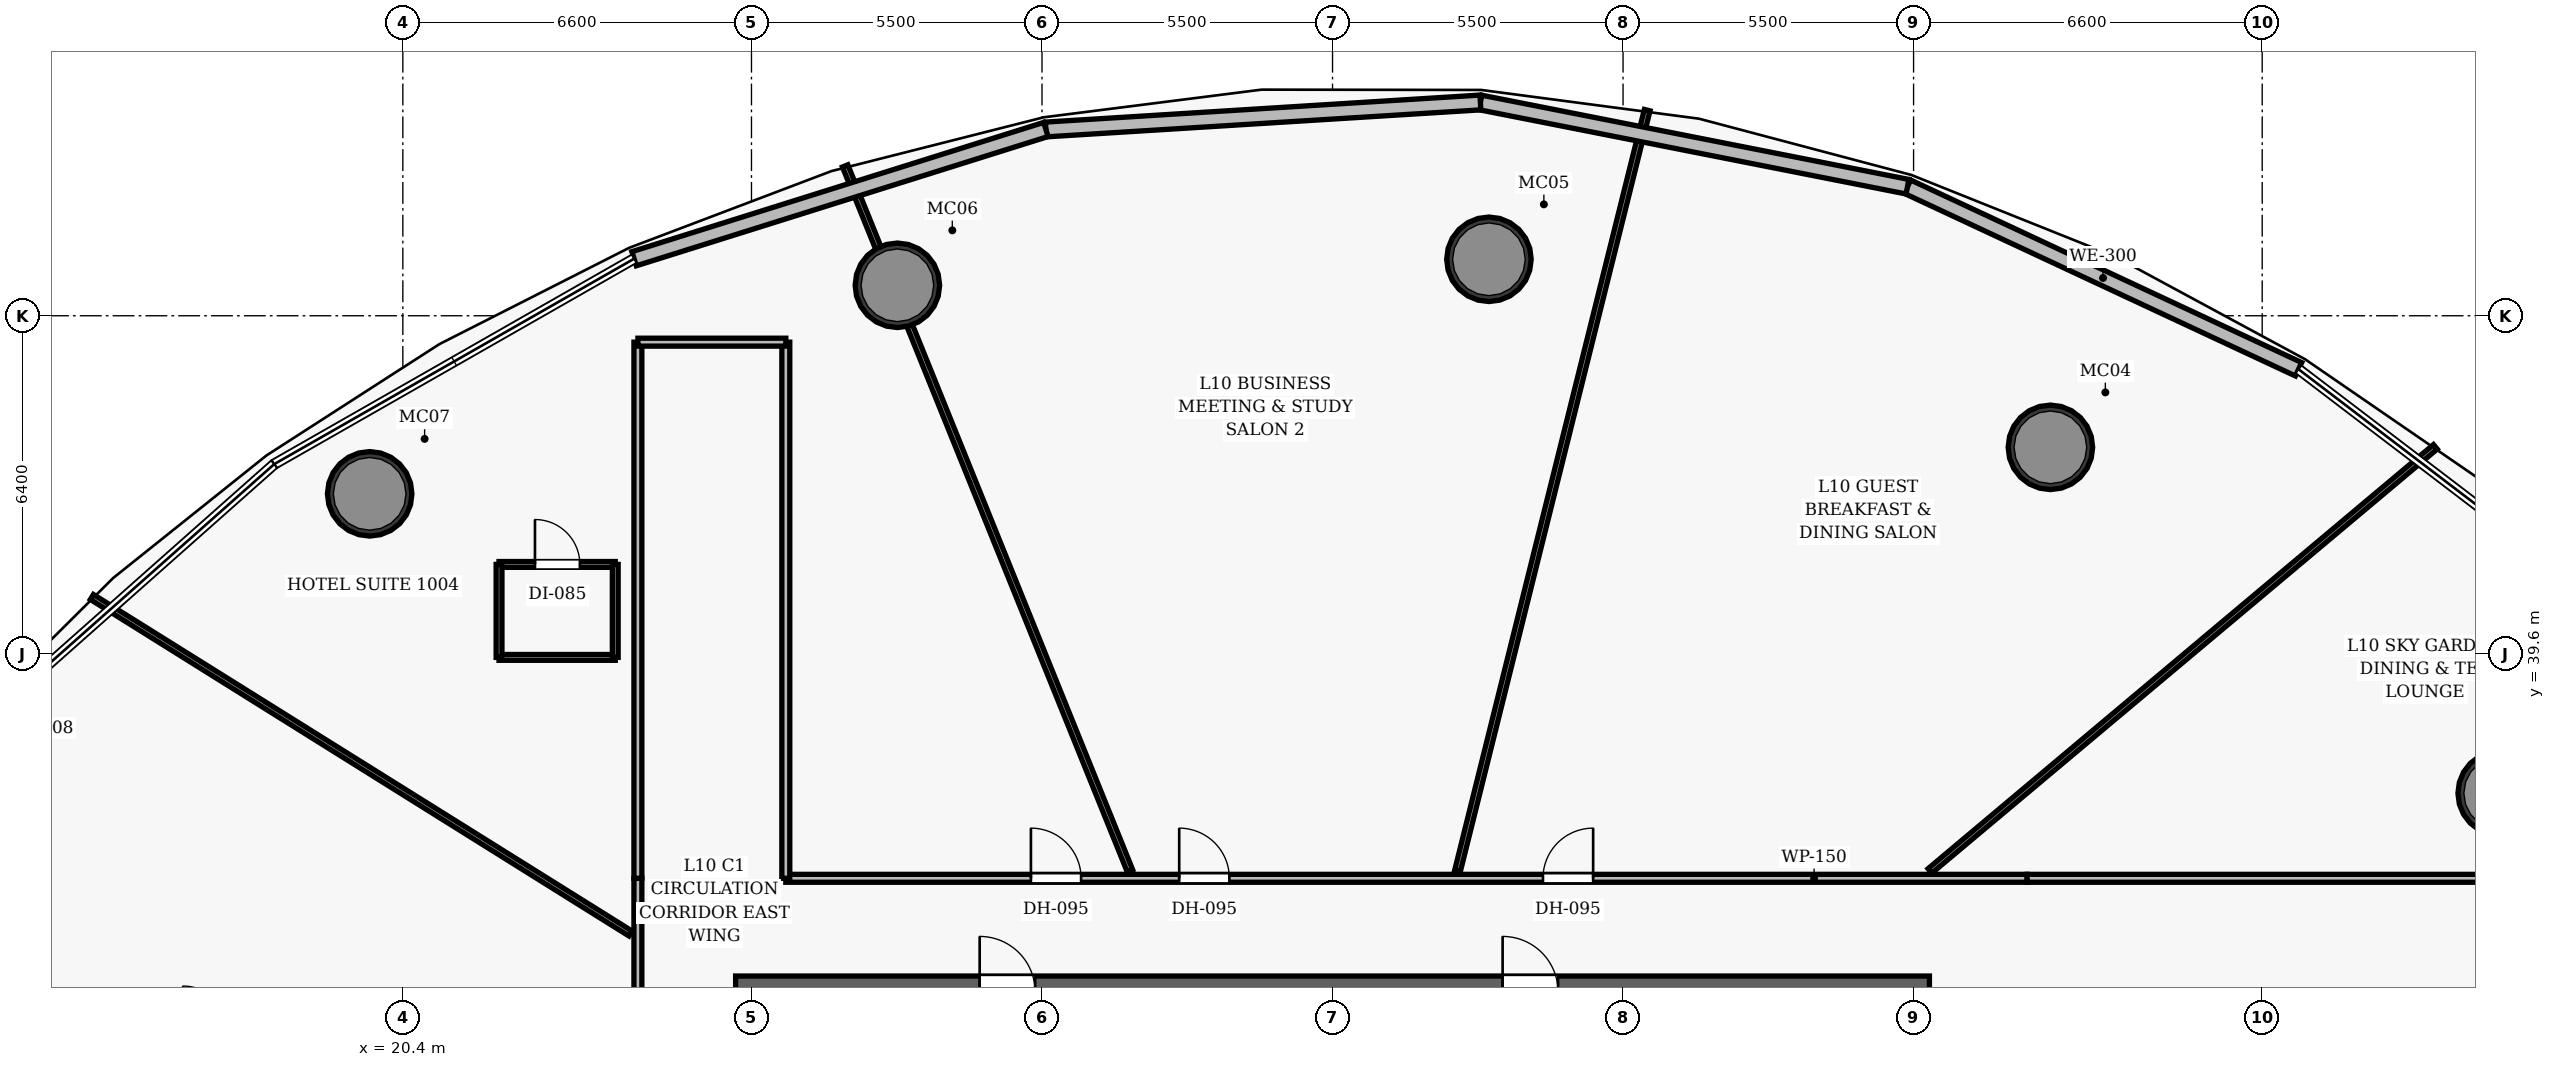
"""IFC4 building model, lengths in metres.
Left out: names, types, materials, properties, quantities, classifications, styles, units other than length and angle.
Written with IfcOpenShell. Run it as: python <this file> out.ifc"""

import sys

from ifc_helpers import new_model, si_unit, direction, frame, frame_2d, origin, origin_2d, place, context, subcontext, project, spatial, rectangle, hollow_circle, extrude, element, fill, save


model = new_model("IFC4")
c1 = context("Model", 3, precision=1e-05, world=origin(), true_north=direction((0.0, 1.0)))
c2 = subcontext(c1, "Body", "Model", "MODEL_VIEW")
j1 = project(units=[si_unit("LENGTHUNIT", "METRE"), si_unit("PLANEANGLEUNIT", "RADIAN")], contexts=[c1])
p1 = place(None, origin())
s1 = spatial("IfcSite", under=j1, at=p1, CompositionType="ELEMENT")
p2 = place(p1, origin())
s2 = spatial("IfcBuilding", under=s1, at=p2, CompositionType="ELEMENT")
p3 = place(p2, frame((0.0, 0.0, 51.9)))
s3 = spatial("IfcBuildingStorey", under=s2, at=p3, CompositionType="ELEMENT", Elevation=51.9)
p4 = place(p3, frame((26.7, 33.2, 0.0), z_axis=(0.0, 0.0, 1.0), x_axis=(1.0, 0.0, 0.0)))
e1 = element("IfcWall", 1, at=p4, inside=s3, PredefinedType="SHEAR", context=c2, shape_type="SweptSolid", body=[
    extrude(rectangle(XDim=22.6, YDim=0.6, at=frame_2d((11.3, 0.0))), origin(), (0.0, 0.0, 1.0), 3.5),
])
p5 = place(p4, frame((4.62, 0.0, 0.0)))
e2 = element("IfcOpeningElement", 2, at=p5, cuts=e1, PredefinedType="OPENING", context=c2, shape_type="SweptSolid", body=[
    extrude(rectangle(XDim=1.05, YDim=2.15, at=frame_2d((0.525, 1.075))), frame((0.0, 0.31, 0.0), z_axis=(0.0, -1.0, 0.0), x_axis=(1.0, 0.0, 0.0)), (0.0, 0.0, 1.0), 0.62),
])
p6 = place(p4, frame((14.52, 0.0, 0.0)))
e3 = element("IfcOpeningElement", 3, at=p6, cuts=e1, PredefinedType="OPENING", context=c2, shape_type="SweptSolid", body=[
    extrude(rectangle(XDim=1.05, YDim=2.15, at=frame_2d((0.525, 1.075))), frame((0.0, 0.31, 0.0), z_axis=(0.0, -1.0, 0.0), x_axis=(1.0, 0.0, 0.0)), (0.0, 0.0, 1.0), 0.62),
])
for number, where, z_axis, x_axis in (
    (4, (60.105, 36.96, 0.0), (0.0, 0.0, 1.0), (1.0, 0.0, 0.0)),
    (5, (51.59, 43.509, 0.0), (0.0, 0.0, 1.0), (1.0, 0.0, 0.0)),
    (6, (40.961, 47.069, 0.0), (0.0, 0.0, 1.0), (1.0, 0.0, 0.0)),
    (7, (29.762, 46.577, 0.0), (0.0, 0.0, 1.0), (1.0, 0.0, 0.0)),
    (8, (19.772, 42.629, 0.0), (0.0, 0.0, 1.0), (1.0, 0.0, 0.0)),
):
    element("IfcColumn", number, at=place(p3, frame(where, z_axis=z_axis, x_axis=x_axis)), inside=s3, PredefinedType="COLUMN", context=c2, shape_type="SweptSolid", body=[
        extrude(hollow_circle(Radius=0.8, WallThickness=0.06, at=origin_2d()), origin(), (0.0, 0.0, 1.0), 3.5),
    ])
p7 = place(p3, frame((27.65, 35.35, 0.0), z_axis=(0.0, 0.0, 1.0), x_axis=(1.0, 0.0, 0.0)))
e9 = element("IfcWall", 9, at=p7, inside=s3, PredefinedType="PARTITIONING", context=c2, shape_type="SweptSolid", body=[
    extrude(rectangle(XDim=23.5, YDim=0.15, at=frame_2d((11.75, 0.0))), origin(), (0.0, 0.0, 1.0), 2.6),
])
p8 = place(p7, frame((14.334, 0.0, 0.0)))
e10 = element("IfcOpeningElement", 10, at=p8, cuts=e9, PredefinedType="OPENING", context=c2, shape_type="SweptSolid", body=[
    extrude(rectangle(XDim=0.95, YDim=2.15, at=frame_2d((0.475, 1.075))), frame((0.0, 0.085, 0.0), z_axis=(0.0, -1.0, 0.0), x_axis=(1.0, 0.0, 0.0)), (0.0, 0.0, 1.0), 0.17),
])
p9 = place(p7, frame((7.447, 0.0, 0.0)))
e11 = element("IfcOpeningElement", 11, at=p9, cuts=e9, PredefinedType="OPENING", context=c2, shape_type="SweptSolid", body=[
    extrude(rectangle(XDim=0.95, YDim=2.15, at=frame_2d((0.475, 1.075))), frame((0.0, 0.085, 0.0), z_axis=(0.0, -1.0, 0.0), x_axis=(1.0, 0.0, 0.0)), (0.0, 0.0, 1.0), 0.17),
])
p10 = place(p7, frame((4.64, 0.0, 0.0)))
e12 = element("IfcOpeningElement", 12, at=p10, cuts=e9, PredefinedType="OPENING", context=c2, shape_type="SweptSolid", body=[
    extrude(rectangle(XDim=0.95, YDim=2.15, at=frame_2d((0.475, 1.075))), frame((0.0, 0.085, 0.0), z_axis=(0.0, -1.0, 0.0), x_axis=(1.0, 0.0, 0.0)), (0.0, 0.0, 1.0), 0.17),
])
p11 = place(p3, frame((24.85, 19.45, 0.0), z_axis=(0.0, 0.0, 1.0), x_axis=(0.0, 1.0, 0.0)))
e13 = element("IfcWall", 13, at=p11, inside=s3, PredefinedType="PARTITIONING", context=c2, shape_type="SweptSolid", body=[
    extrude(rectangle(XDim=15.9, YDim=0.15, at=frame_2d((7.95, 0.0))), origin(), (0.0, 0.0, 1.0), 2.6),
])
p12 = place(p11, frame((7.305, 0.0, 0.0)))
e14 = element("IfcOpeningElement", 14, at=p12, cuts=e13, PredefinedType="OPENING", context=c2, shape_type="SweptSolid", body=[
    extrude(rectangle(XDim=0.95, YDim=2.15, at=frame_2d((0.475, 1.075))), frame((0.0, 0.085, 0.0), z_axis=(0.0, -1.0, 0.0), x_axis=(1.0, 0.0, 0.0)), (0.0, 0.0, 1.0), 0.17),
])
p13 = place(p11, frame((3.964, 0.0, 0.0)))
e15 = element("IfcOpeningElement", 15, at=p13, cuts=e13, PredefinedType="OPENING", context=c2, shape_type="SweptSolid", body=[
    extrude(rectangle(XDim=0.95, YDim=2.15, at=frame_2d((0.475, 1.075))), frame((0.0, 0.085, 0.0), z_axis=(0.0, -1.0, 0.0), x_axis=(1.0, 0.0, 0.0)), (0.0, 0.0, 1.0), 0.17),
])
p14 = place(p3, frame((51.15, 35.35, 0.0), z_axis=(0.0, 0.0, 1.0), x_axis=(1.0, 0.0, 0.0)))
e16 = element("IfcWall", 16, at=p14, inside=s3, PredefinedType="PARTITIONING", context=c2, shape_type="SweptSolid", body=[
    extrude(rectangle(XDim=14.35, YDim=0.15, at=frame_2d((7.175, 0.0))), origin(), (0.0, 0.0, 1.0), 2.6),
])
for number, where, z_axis, x_axis in (
    (17, (24.85, 35.35, 0.0), (0.0, 0.0, 1.0), (0.0, 1.0, 0.0)),
    (18, (27.65, 35.35, 0.0), (0.0, 0.0, 1.0), (0.0, 1.0, 0.0)),
):
    element("IfcWall", number, at=place(p3, frame(where, z_axis=z_axis, x_axis=x_axis)), inside=s3, PredefinedType="PARTITIONING", context=c2, shape_type="SweptSolid", body=[
        extrude(rectangle(XDim=10.15, YDim=0.15, at=frame_2d((5.075, 0.0))), origin(), (0.0, 0.0, 1.0), 2.6),
    ])
p15 = place(p3, frame((24.85, 45.5, 0.0), z_axis=(0.0, 0.0, 1.0), x_axis=(1.0, 0.0, 0.0)))
e19 = element("IfcWall", 19, at=p15, inside=s3, PredefinedType="PARTITIONING", context=c2, shape_type="SweptSolid", body=[
    extrude(rectangle(XDim=2.8, YDim=0.15, at=frame_2d((1.4, 0.0))), origin(), (0.0, 0.0, 1.0), 2.6),
])
p16 = place(p3, frame((49.31, 35.49, 0.0), z_axis=(0.0, 0.0, 1.0), x_axis=(0.766037845648, 0.642795472165, 0.0)))
e20 = element("IfcWall", 20, at=p16, inside=s3, PredefinedType="PARTITIONING", context=c2, shape_type="SweptSolid", body=[
    extrude(rectangle(XDim=12.49, YDim=0.11, at=frame_2d((6.245, 0.0))), origin(), (0.0, 0.0, 1.0), 2.6),
])
p17 = place(p3, frame((40.366, 35.49, 0.0), z_axis=(0.0, 0.0, 1.0), x_axis=(0.241912498143, 0.970298069277, 0.0)))
e21 = element("IfcWall", 21, at=p17, inside=s3, PredefinedType="PARTITIONING", context=c2, shape_type="SweptSolid", body=[
    extrude(rectangle(XDim=14.844, YDim=0.11, at=frame_2d((7.422, 0.0))), origin(), (0.0, 0.0, 1.0), 2.6),
])
p18 = place(p3, frame((34.166, 35.49, 0.0), z_axis=(0.0, 0.0, 1.0), x_axis=(-0.374610825382, 0.92718214473, 0.0)))
e22 = element("IfcWall", 22, at=p18, inside=s3, PredefinedType="PARTITIONING", context=c2, shape_type="SweptSolid", body=[
    extrude(rectangle(XDim=14.395, YDim=0.11, at=frame_2d((7.198, 0.0))), origin(), (0.0, 0.0, 1.0), 2.6),
])
p19 = place(p3, frame((24.71, 34.304, 0.0), z_axis=(0.0, 0.0, 1.0), x_axis=(-0.848050772958, 0.529914980431, 0.0)))
e23 = element("IfcWall", 23, at=p19, inside=s3, PredefinedType="PARTITIONING", context=c2, shape_type="SweptSolid", body=[
    extrude(rectangle(XDim=12.024, YDim=0.11, at=frame_2d((6.012, 0.0))), origin(), (0.0, 0.0, 1.0), 2.6),
])
p20 = place(p3, frame((22.221, 39.532, 0.0), z_axis=(0.0, 0.0, 1.0), x_axis=(1.0, 0.0, 0.0)))
e24 = element("IfcWall", 24, at=p20, inside=s3, PredefinedType="PARTITIONING", context=c2, shape_type="SweptSolid", body=[
    extrude(rectangle(XDim=2.2, YDim=0.11, at=frame_2d((1.1, 0.0))), origin(), (0.0, 0.0, 1.0), 2.6),
])
p21 = place(p3, frame((22.221, 41.292, 0.0), z_axis=(0.0, 0.0, 1.0), x_axis=(1.0, 0.0, 0.0)))
e25 = element("IfcWall", 25, at=p21, inside=s3, PredefinedType="PARTITIONING", context=c2, shape_type="SweptSolid", body=[
    extrude(rectangle(XDim=2.2, YDim=0.11, at=frame_2d((1.1, 0.0))), origin(), (0.0, 0.0, 1.0), 2.6),
])
p22 = place(p21, frame((0.68, 0.0, 0.0)))
e26 = element("IfcOpeningElement", 26, at=p22, cuts=e25, PredefinedType="OPENING", context=c2, shape_type="SweptSolid", body=[
    extrude(rectangle(XDim=0.85, YDim=2.1, at=frame_2d((0.425, 1.05))), frame((0.0, 0.065, 0.0), z_axis=(0.0, -1.0, 0.0), x_axis=(1.0, 0.0, 0.0)), (0.0, 0.0, 1.0), 0.13),
])
for number, where, z_axis, x_axis in (
    (27, (22.221, 39.532, 0.0), (0.0, 0.0, 1.0), (0.0, 1.0, 0.0)),
    (28, (24.421, 39.532, 0.0), (0.0, 0.0, 1.0), (0.0, 1.0, 0.0)),
):
    element("IfcWall", number, at=place(p3, frame(where, z_axis=z_axis, x_axis=x_axis)), inside=s3, PredefinedType="PARTITIONING", context=c2, shape_type="SweptSolid", body=[
        extrude(rectangle(XDim=1.76, YDim=0.11, at=frame_2d((0.88, 0.0))), origin(), (0.0, 0.0, 1.0), 2.6),
    ])
p23 = place(p3, frame((48.885, 48.443, 0.0), z_axis=(0.0, 0.0, 1.0), x_axis=(0.906115954936, -0.423029403482, 0.0)))
e29 = element("IfcWall", 29, at=p23, inside=s3, PredefinedType="SOLIDWALL", context=c2, shape_type="SweptSolid", body=[
    extrude(rectangle(XDim=8.171, YDim=0.28, at=frame_2d((4.085, 0.0))), origin(), (0.0, 0.0, 1.0), 3.25),
])
p24 = place(p3, frame((40.799, 50.038, 0.0), z_axis=(0.0, 0.0, 1.0), x_axis=(0.981104672244, -0.193477704403, 0.0)))
e30 = element("IfcWall", 30, at=p24, inside=s3, PredefinedType="SOLIDWALL", context=c2, shape_type="SweptSolid", body=[
    extrude(rectangle(XDim=8.241, YDim=0.28, at=frame_2d((4.121, 0.0))), origin(), (0.0, 0.0, 1.0), 3.25),
])
p25 = place(p3, frame((32.574, 49.527, 0.0), z_axis=(0.0, 0.0, 1.0), x_axis=(0.998076021969, 0.062002051347, 0.0)))
e31 = element("IfcWall", 31, at=p25, inside=s3, PredefinedType="SOLIDWALL", context=c2, shape_type="SweptSolid", body=[
    extrude(rectangle(XDim=8.241, YDim=0.28, at=frame_2d((4.121, 0.0))), origin(), (0.0, 0.0, 1.0), 3.25),
])
p26 = place(p3, frame((24.778, 47.08, 0.0), z_axis=(0.0, 0.0, 1.0), x_axis=(0.954100123885, 0.299487818787, 0.0)))
e32 = element("IfcWall", 32, at=p26, inside=s3, PredefinedType="SOLIDWALL", context=c2, shape_type="SweptSolid", body=[
    extrude(rectangle(XDim=8.171, YDim=0.28, at=frame_2d((4.085, 0.0))), origin(), (0.0, 0.0, 1.0), 3.25),
])
p27 = place(p8, origin())
e33 = element("IfcDoor", 33, at=p27, inside=s3, OperationType="SINGLE_SWING_RIGHT", PredefinedType="DOOR", context=c2, shape_type="SweptSolid", body=[
    extrude(rectangle(XDim=0.95, YDim=2.15, at=frame_2d((0.475, 1.075))), frame((0.0, 0.025, 0.0), z_axis=(0.0, -1.0, 0.0), x_axis=(1.0, 0.0, 0.0)), (0.0, 0.0, 1.0), 0.05),
])
fill(e10, e33)
p28 = place(p9, origin())
e34 = element("IfcDoor", 34, at=p28, inside=s3, OperationType="SINGLE_SWING_LEFT", PredefinedType="DOOR", context=c2, shape_type="SweptSolid", body=[
    extrude(rectangle(XDim=0.95, YDim=2.15, at=frame_2d((0.475, 1.075))), frame((0.0, 0.025, 0.0), z_axis=(0.0, -1.0, 0.0), x_axis=(1.0, 0.0, 0.0)), (0.0, 0.0, 1.0), 0.05),
])
fill(e11, e34)
p29 = place(p10, origin())
e35 = element("IfcDoor", 35, at=p29, inside=s3, OperationType="SINGLE_SWING_LEFT", PredefinedType="DOOR", context=c2, shape_type="SweptSolid", body=[
    extrude(rectangle(XDim=0.95, YDim=2.15, at=frame_2d((0.475, 1.075))), frame((0.0, 0.025, 0.0), z_axis=(0.0, -1.0, 0.0), x_axis=(1.0, 0.0, 0.0)), (0.0, 0.0, 1.0), 0.05),
])
fill(e12, e35)
p30 = place(p22, origin())
e36 = element("IfcDoor", 36, at=p30, inside=s3, OperationType="SINGLE_SWING_LEFT", PredefinedType="DOOR", context=c2, shape_type="SweptSolid", body=[
    extrude(rectangle(XDim=0.85, YDim=2.1, at=frame_2d((0.425, 1.05))), frame((0.0, 0.025, 0.0), z_axis=(0.0, -1.0, 0.0), x_axis=(1.0, 0.0, 0.0)), (0.0, 0.0, 1.0), 0.05),
])
fill(e26, e36)
save(model, sys.argv[1])
